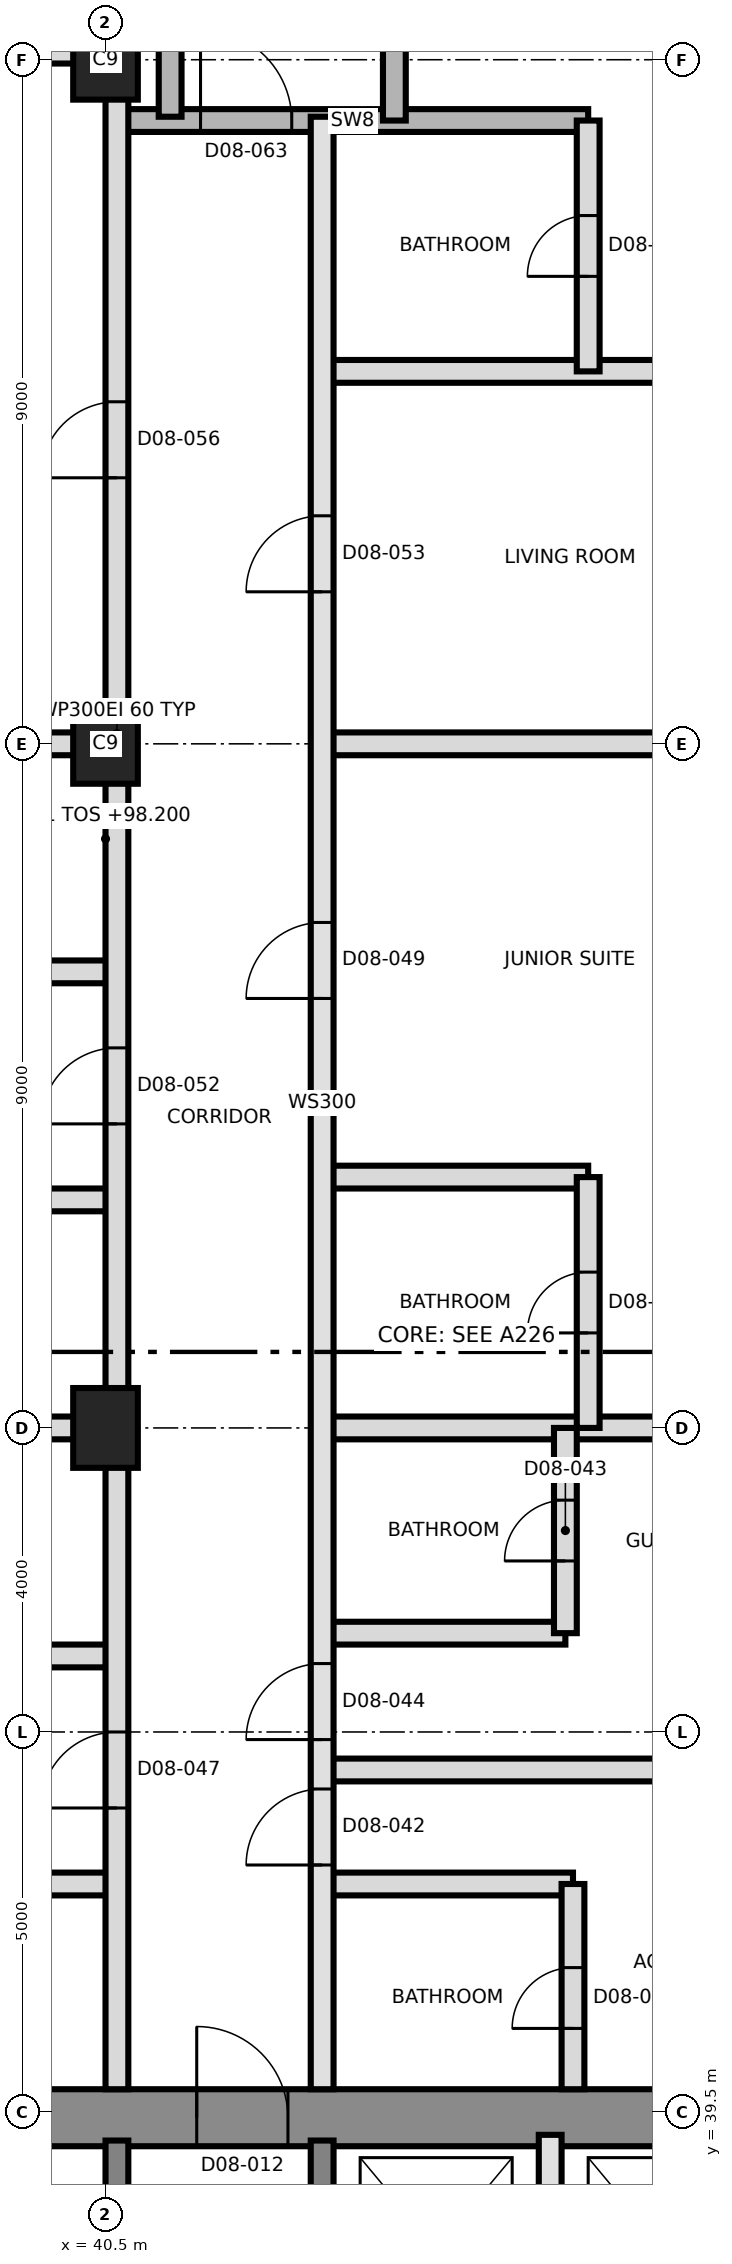
"""IFC4 building model, lengths in metres.
Left out: names, types, materials, properties, quantities, classifications, styles, units other than length and angle.
Written with IfcOpenShell. Run it as: python <this file> out.ifc"""

import sys

from ifc_helpers import new_model, si_unit, direction, frame, frame_2d, origin, origin_2d, place, context, subcontext, project, spatial, rectangle, extrude, element, fill, save


model = new_model("IFC4")
c1 = context("Model", 3, precision=1e-05, world=origin(), true_north=direction((0.0, 1.0)))
c2 = subcontext(c1, "Body", "Model", "MODEL_VIEW")
j1 = project(units=[si_unit("LENGTHUNIT", "METRE"), si_unit("PLANEANGLEUNIT", "RADIAN")], contexts=[c1])
p1 = place(None, origin())
s1 = spatial("IfcSite", under=j1, at=p1, CompositionType="ELEMENT")
p2 = place(p1, origin())
s2 = spatial("IfcBuilding", under=s1, at=p2, CompositionType="ELEMENT")
p3 = place(p2, frame((0.0, 0.0, 98.2)))
s3 = spatial("IfcBuildingStorey", under=s2, at=p3, CompositionType="ELEMENT", Elevation=98.2)
p4 = place(p3, frame((31.125, 39.425, 0.0), z_axis=(0.0, 0.0, 1.0), x_axis=(1.0, 0.0, 0.0)))
e1 = element("IfcWall", 1, at=p4, inside=s3, PredefinedType="SHEAR", context=c2, shape_type="SweptSolid", body=[
    extrude(rectangle(XDim=27.0, YDim=0.75, at=frame_2d((13.5, 0.0))), origin(), (0.0, 0.0, 1.0), 3.7),
])
p5 = place(p4, frame((10.575, 0.0, 0.0)))
e2 = element("IfcOpeningElement", 2, at=p5, cuts=e1, PredefinedType="OPENING", context=c2, shape_type="SweptSolid", body=[
    extrude(rectangle(XDim=1.2, YDim=2.1, at=frame_2d((0.6, 1.05))), frame((0.0, 0.385, 0.0), z_axis=(0.0, -1.0, 0.0), x_axis=(1.0, 0.0, 0.0)), (0.0, 0.0, 1.0), 0.77),
])
for number, where, z_axis, x_axis in (
    (3, (40.65, 33.5, 0.0), (0.0, 0.0, 1.0), (0.0, 1.0, 0.0)),
    (4, (43.35, 33.5, 0.0), (0.0, 0.0, 1.0), (0.0, 1.0, 0.0)),
):
    element("IfcWall", number, at=place(p3, frame(where, z_axis=z_axis, x_axis=x_axis)), inside=s3, PredefinedType="SHEAR", context=c2, shape_type="SweptSolid", body=[
        extrude(rectangle(XDim=5.625, YDim=0.3, at=frame_2d((2.812, 0.0))), origin(), (0.0, 0.0, 1.0), 3.7),
    ])
for number, where, z_axis, x_axis in (
    (5, (40.5, 48.5, 0.0), (0.0, 0.0, 1.0), (0.0, 1.0, 0.0)),
    (6, (40.5, 57.5, 0.0), (0.0, 0.0, 1.0), (0.0, 1.0, 0.0)),
    (7, (40.5, 66.5, 0.0), (0.0, 0.0, 1.0), (0.0, 1.0, 0.0)),
):
    element("IfcColumn", number, at=place(p3, frame(where, z_axis=z_axis, x_axis=x_axis)), inside=s3, PredefinedType="COLUMN", context=c2, shape_type="SweptSolid", body=[
        extrude(rectangle(XDim=1.05, YDim=0.85, at=origin_2d()), origin(), (0.0, 0.0, 1.0), 3.7),
    ])
p6 = place(p3, frame((46.35, 36.2, 0.0), z_axis=(0.0, 0.0, 1.0), x_axis=(0.0, 1.0, 0.0)))
e8 = element("IfcWall", 8, at=p6, inside=s3, PredefinedType="SOLIDWALL", context=c2, shape_type="SweptSolid", body=[
    extrude(rectangle(XDim=3.0, YDim=0.3, at=frame_2d((1.5, 0.0))), origin(), (0.0, 0.0, 1.0), 3.4),
])
for number, where, z_axis, x_axis in (
    (9, (37.35, 42.5, 0.0), (0.0, 0.0, 1.0), (1.0, 0.0, 0.0)),
    (10, (43.35, 42.5, 0.0), (0.0, 0.0, 1.0), (1.0, 0.0, 0.0)),
):
    element("IfcWall", number, at=place(p3, frame(where, z_axis=z_axis, x_axis=x_axis)), inside=s3, PredefinedType="PARTITIONING", context=c2, shape_type="SweptSolid", body=[
        extrude(rectangle(XDim=3.3, YDim=0.3, at=frame_2d((1.65, 0.0))), origin(), (0.0, 0.0, 1.0), 3.4),
    ])
p7 = place(p3, frame((43.35, 44.0, 0.0), z_axis=(0.0, 0.0, 1.0), x_axis=(1.0, 0.0, 0.0)))
e11 = element("IfcWall", 11, at=p7, inside=s3, PredefinedType="PARTITIONING", context=c2, shape_type="SweptSolid", body=[
    extrude(rectangle(XDim=6.596, YDim=0.3, at=frame_2d((3.298, 0.0))), origin(), (0.0, 0.0, 1.0), 3.4),
])
p8 = place(p3, frame((37.35, 45.5, 0.0), z_axis=(0.0, 0.0, 1.0), x_axis=(1.0, 0.0, 0.0)))
e12 = element("IfcWall", 12, at=p8, inside=s3, PredefinedType="PARTITIONING", context=c2, shape_type="SweptSolid", body=[
    extrude(rectangle(XDim=3.3, YDim=0.3, at=frame_2d((1.65, 0.0))), origin(), (0.0, 0.0, 1.0), 3.4),
])
p9 = place(p3, frame((43.35, 45.8, 0.0), z_axis=(0.0, 0.0, 1.0), x_axis=(1.0, 0.0, 0.0)))
e13 = element("IfcWall", 13, at=p9, inside=s3, PredefinedType="PARTITIONING", context=c2, shape_type="SweptSolid", body=[
    extrude(rectangle(XDim=3.2, YDim=0.3, at=frame_2d((1.6, 0.0))), origin(), (0.0, 0.0, 1.0), 3.4),
])
p10 = place(p3, frame((31.53, 48.5, 0.0), z_axis=(0.0, 0.0, 1.0), x_axis=(1.0, 0.0, 0.0)))
e14 = element("IfcWall", 14, at=p10, inside=s3, PredefinedType="PARTITIONING", context=c2, shape_type="SweptSolid", body=[
    extrude(rectangle(XDim=9.12, YDim=0.3, at=frame_2d((4.56, 0.0))), origin(), (0.0, 0.0, 1.0), 3.4),
])
p11 = place(p3, frame((43.35, 48.5, 0.0), z_axis=(0.0, 0.0, 1.0), x_axis=(1.0, 0.0, 0.0)))
e15 = element("IfcWall", 15, at=p11, inside=s3, PredefinedType="PARTITIONING", context=c2, shape_type="SweptSolid", body=[
    extrude(rectangle(XDim=6.12, YDim=0.3, at=frame_2d((3.06, 0.0))), origin(), (0.0, 0.0, 1.0), 3.4),
])
p12 = place(p3, frame((37.35, 51.5, 0.0), z_axis=(0.0, 0.0, 1.0), x_axis=(1.0, 0.0, 0.0)))
e16 = element("IfcWall", 16, at=p12, inside=s3, PredefinedType="PARTITIONING", context=c2, shape_type="SweptSolid", body=[
    extrude(rectangle(XDim=3.3, YDim=0.3, at=frame_2d((1.65, 0.0))), origin(), (0.0, 0.0, 1.0), 3.4),
])
p13 = place(p3, frame((43.35, 51.8, 0.0), z_axis=(0.0, 0.0, 1.0), x_axis=(1.0, 0.0, 0.0)))
e17 = element("IfcWall", 17, at=p13, inside=s3, PredefinedType="PARTITIONING", context=c2, shape_type="SweptSolid", body=[
    extrude(rectangle(XDim=3.5, YDim=0.3, at=frame_2d((1.75, 0.0))), origin(), (0.0, 0.0, 1.0), 3.4),
])
p14 = place(p3, frame((37.35, 54.5, 0.0), z_axis=(0.0, 0.0, 1.0), x_axis=(1.0, 0.0, 0.0)))
e18 = element("IfcWall", 18, at=p14, inside=s3, PredefinedType="PARTITIONING", context=c2, shape_type="SweptSolid", body=[
    extrude(rectangle(XDim=3.3, YDim=0.3, at=frame_2d((1.65, 0.0))), origin(), (0.0, 0.0, 1.0), 3.4),
])
p15 = place(p3, frame((31.53, 57.5, 0.0), z_axis=(0.0, 0.0, 1.0), x_axis=(1.0, 0.0, 0.0)))
e19 = element("IfcWall", 19, at=p15, inside=s3, PredefinedType="PARTITIONING", context=c2, shape_type="SweptSolid", body=[
    extrude(rectangle(XDim=9.12, YDim=0.3, at=frame_2d((4.56, 0.0))), origin(), (0.0, 0.0, 1.0), 3.4),
])
p16 = place(p3, frame((43.35, 57.5, 0.0), z_axis=(0.0, 0.0, 1.0), x_axis=(1.0, 0.0, 0.0)))
e20 = element("IfcWall", 20, at=p16, inside=s3, PredefinedType="PARTITIONING", context=c2, shape_type="SweptSolid", body=[
    extrude(rectangle(XDim=6.12, YDim=0.3, at=frame_2d((3.06, 0.0))), origin(), (0.0, 0.0, 1.0), 3.4),
])
p17 = place(p3, frame((43.35, 62.4, 0.0), z_axis=(0.0, 0.0, 1.0), x_axis=(1.0, 0.0, 0.0)))
e21 = element("IfcWall", 21, at=p17, inside=s3, PredefinedType="PARTITIONING", context=c2, shape_type="SweptSolid", body=[
    extrude(rectangle(XDim=6.3, YDim=0.3, at=frame_2d((3.15, 0.0))), origin(), (0.0, 0.0, 1.0), 3.4),
])
p18 = place(p17, frame((4.65, 0.0, 0.0)))
e22 = element("IfcOpeningElement", 22, at=p18, cuts=e21, PredefinedType="OPENING", context=c2, shape_type="SweptSolid", body=[
    extrude(rectangle(XDim=1.0, YDim=2.1, at=frame_2d((0.5, 1.05))), frame((0.0, 0.16, 0.0), z_axis=(0.0, -1.0, 0.0), x_axis=(1.0, 0.0, 0.0)), (0.0, 0.0, 1.0), 0.32),
])
p19 = place(p3, frame((40.65, 65.7, 0.0), z_axis=(0.0, 0.0, 1.0), x_axis=(1.0, 0.0, 0.0)))
e23 = element("IfcWall", 23, at=p19, inside=s3, PredefinedType="SHEAR", context=c2, shape_type="SweptSolid", body=[
    extrude(rectangle(XDim=6.2, YDim=0.3, at=frame_2d((3.1, 0.0))), origin(), (0.0, 0.0, 1.0), 3.4),
])
p20 = place(p19, frame((1.1, 0.0, 0.0)))
e24 = element("IfcOpeningElement", 24, at=p20, cuts=e23, PredefinedType="OPENING", context=c2, shape_type="SweptSolid", body=[
    extrude(rectangle(XDim=1.2, YDim=2.1, at=frame_2d((0.6, 1.05))), frame((0.0, 0.16, 0.0), z_axis=(0.0, -1.0, 0.0), x_axis=(1.0, 0.0, 0.0)), (0.0, 0.0, 1.0), 0.32),
])
p21 = place(p3, frame((31.53, 66.6, 0.0), z_axis=(0.0, 0.0, 1.0), x_axis=(1.0, 0.0, 0.0)))
e25 = element("IfcWall", 25, at=p21, inside=s3, PredefinedType="PARTITIONING", context=c2, shape_type="SweptSolid", body=[
    extrude(rectangle(XDim=9.12, YDim=0.3, at=frame_2d((4.56, 0.0))), origin(), (0.0, 0.0, 1.0), 3.4),
])
p22 = place(p21, frame((3.47, 0.0, 0.0)))
e26 = element("IfcOpeningElement", 26, at=p22, cuts=e25, PredefinedType="OPENING", context=c2, shape_type="SweptSolid", body=[
    extrude(rectangle(XDim=1.0, YDim=2.1, at=frame_2d((0.5, 1.05))), frame((0.0, 0.16, 0.0), z_axis=(0.0, -1.0, 0.0), x_axis=(1.0, 0.0, 0.0)), (0.0, 0.0, 1.0), 0.32),
])
p23 = place(p3, frame((40.65, 39.8, 0.0), z_axis=(0.0, 0.0, 1.0), x_axis=(0.0, 1.0, 0.0)))
e27 = element("IfcWall", 27, at=p23, inside=s3, PredefinedType="PARTITIONING", context=c2, shape_type="SweptSolid", body=[
    extrude(rectangle(XDim=35.67, YDim=0.3, at=frame_2d((17.835, 0.0))), origin(), (0.0, 0.0, 1.0), 3.4),
])
p24 = place(p23, frame((3.7, 0.0, 0.0)))
e28 = element("IfcOpeningElement", 28, at=p24, cuts=e27, PredefinedType="OPENING", context=c2, shape_type="SweptSolid", body=[
    extrude(rectangle(XDim=1.0, YDim=2.4, at=frame_2d((0.5, 1.2))), frame((0.0, 0.16, 0.0), z_axis=(0.0, -1.0, 0.0), x_axis=(1.0, 0.0, 0.0)), (0.0, 0.0, 1.0), 0.32),
])
p25 = place(p23, frame((12.7, 0.0, 0.0)))
e29 = element("IfcOpeningElement", 29, at=p25, cuts=e27, PredefinedType="OPENING", context=c2, shape_type="SweptSolid", body=[
    extrude(rectangle(XDim=1.0, YDim=2.4, at=frame_2d((0.5, 1.2))), frame((0.0, 0.16, 0.0), z_axis=(0.0, -1.0, 0.0), x_axis=(1.0, 0.0, 0.0)), (0.0, 0.0, 1.0), 0.32),
])
p26 = place(p23, frame((21.2, 0.0, 0.0)))
e30 = element("IfcOpeningElement", 30, at=p26, cuts=e27, PredefinedType="OPENING", context=c2, shape_type="SweptSolid", body=[
    extrude(rectangle(XDim=1.0, YDim=2.4, at=frame_2d((0.5, 1.2))), frame((0.0, 0.16, 0.0), z_axis=(0.0, -1.0, 0.0), x_axis=(1.0, 0.0, 0.0)), (0.0, 0.0, 1.0), 0.32),
])
p27 = place(p3, frame((41.35, 65.75, 0.0), z_axis=(0.0, 0.0, 1.0), x_axis=(0.0, 1.0, 0.0)))
e31 = element("IfcWall", 31, at=p27, inside=s3, PredefinedType="SHEAR", context=c2, shape_type="SweptSolid", body=[
    extrude(rectangle(XDim=8.85, YDim=0.3, at=frame_2d((4.425, 0.0))), origin(), (0.0, 0.0, 1.0), 3.4),
])
p28 = place(p3, frame((43.35, 39.8, 0.0), z_axis=(0.0, 0.0, 1.0), x_axis=(0.0, 1.0, 0.0)))
e32 = element("IfcWall", 32, at=p28, inside=s3, PredefinedType="SOLIDWALL", context=c2, shape_type="SweptSolid", body=[
    extrude(rectangle(XDim=25.95, YDim=0.3, at=frame_2d((12.975, 0.0))), origin(), (0.0, 0.0, 1.0), 3.4),
])
p29 = place(p28, frame((2.95, 0.0, 0.0)))
e33 = element("IfcOpeningElement", 33, at=p29, cuts=e32, PredefinedType="OPENING", context=c2, shape_type="SweptSolid", body=[
    extrude(rectangle(XDim=1.0, YDim=2.1, at=frame_2d((0.5, 1.05))), frame((0.0, 0.16, 0.0), z_axis=(0.0, -1.0, 0.0), x_axis=(1.0, 0.0, 0.0)), (0.0, 0.0, 1.0), 0.32),
])
p30 = place(p28, frame((4.6, 0.0, 0.0)))
e34 = element("IfcOpeningElement", 34, at=p30, cuts=e32, PredefinedType="OPENING", context=c2, shape_type="SweptSolid", body=[
    extrude(rectangle(XDim=1.0, YDim=2.1, at=frame_2d((0.5, 1.05))), frame((0.0, 0.16, 0.0), z_axis=(0.0, -1.0, 0.0), x_axis=(1.0, 0.0, 0.0)), (0.0, 0.0, 1.0), 0.32),
])
p31 = place(p28, frame((14.35, 0.0, 0.0)))
e35 = element("IfcOpeningElement", 35, at=p31, cuts=e32, PredefinedType="OPENING", context=c2, shape_type="SweptSolid", body=[
    extrude(rectangle(XDim=1.0, YDim=2.4, at=frame_2d((0.5, 1.2))), frame((0.0, 0.16, 0.0), z_axis=(0.0, -1.0, 0.0), x_axis=(1.0, 0.0, 0.0)), (0.0, 0.0, 1.0), 0.32),
])
p32 = place(p28, frame((19.7, 0.0, 0.0)))
e36 = element("IfcOpeningElement", 36, at=p32, cuts=e32, PredefinedType="OPENING", context=c2, shape_type="SweptSolid", body=[
    extrude(rectangle(XDim=1.0, YDim=2.4, at=frame_2d((0.5, 1.2))), frame((0.0, 0.16, 0.0), z_axis=(0.0, -1.0, 0.0), x_axis=(1.0, 0.0, 0.0)), (0.0, 0.0, 1.0), 0.32),
])
p33 = place(p3, frame((44.3, 65.7, 0.0), z_axis=(0.0, 0.0, 1.0), x_axis=(0.0, 1.0, 0.0)))
e37 = element("IfcWall", 37, at=p33, inside=s3, PredefinedType="SHEAR", context=c2, shape_type="SweptSolid", body=[
    extrude(rectangle(XDim=8.9, YDim=0.3, at=frame_2d((4.45, 0.0))), origin(), (0.0, 0.0, 1.0), 3.4),
])
p34 = place(p3, frame((46.55, 45.8, 0.0), z_axis=(0.0, 0.0, 1.0), x_axis=(0.0, 1.0, 0.0)))
e38 = element("IfcWall", 38, at=p34, inside=s3, PredefinedType="PARTITIONING", context=c2, shape_type="SweptSolid", body=[
    extrude(rectangle(XDim=2.7, YDim=0.3, at=frame_2d((1.35, 0.0))), origin(), (0.0, 0.0, 1.0), 3.4),
])
p35 = place(p34, frame((0.95, 0.0, 0.0)))
e39 = element("IfcOpeningElement", 39, at=p35, cuts=e38, PredefinedType="OPENING", context=c2, shape_type="SweptSolid", body=[
    extrude(rectangle(XDim=0.8, YDim=2.1, at=frame_2d((0.4, 1.05))), frame((0.0, 0.16, 0.0), z_axis=(0.0, -1.0, 0.0), x_axis=(1.0, 0.0, 0.0)), (0.0, 0.0, 1.0), 0.32),
])
p36 = place(p3, frame((46.65, 39.8, 0.0), z_axis=(0.0, 0.0, 1.0), x_axis=(0.0, 1.0, 0.0)))
e40 = element("IfcWall", 40, at=p36, inside=s3, PredefinedType="PARTITIONING", context=c2, shape_type="SweptSolid", body=[
    extrude(rectangle(XDim=2.7, YDim=0.3, at=frame_2d((1.35, 0.0))), origin(), (0.0, 0.0, 1.0), 3.4),
])
p37 = place(p36, frame((0.8, 0.0, 0.0)))
e41 = element("IfcOpeningElement", 41, at=p37, cuts=e40, PredefinedType="OPENING", context=c2, shape_type="SweptSolid", body=[
    extrude(rectangle(XDim=0.8, YDim=2.1, at=frame_2d((0.4, 1.05))), frame((0.0, 0.16, 0.0), z_axis=(0.0, -1.0, 0.0), x_axis=(1.0, 0.0, 0.0)), (0.0, 0.0, 1.0), 0.32),
])
p38 = place(p3, frame((46.85, 48.5, 0.0), z_axis=(0.0, 0.0, 1.0), x_axis=(0.0, 1.0, 0.0)))
e42 = element("IfcWall", 42, at=p38, inside=s3, PredefinedType="PARTITIONING", context=c2, shape_type="SweptSolid", body=[
    extrude(rectangle(XDim=3.3, YDim=0.3, at=frame_2d((1.65, 0.0))), origin(), (0.0, 0.0, 1.0), 3.4),
])
p39 = place(p38, frame((1.25, 0.0, 0.0)))
e43 = element("IfcOpeningElement", 43, at=p39, cuts=e42, PredefinedType="OPENING", context=c2, shape_type="SweptSolid", body=[
    extrude(rectangle(XDim=0.8, YDim=2.1, at=frame_2d((0.4, 1.05))), frame((0.0, 0.16, 0.0), z_axis=(0.0, -1.0, 0.0), x_axis=(1.0, 0.0, 0.0)), (0.0, 0.0, 1.0), 0.32),
])
p40 = place(p3, frame((46.85, 62.4, 0.0), z_axis=(0.0, 0.0, 1.0), x_axis=(0.0, 1.0, 0.0)))
e44 = element("IfcWall", 44, at=p40, inside=s3, PredefinedType="PARTITIONING", context=c2, shape_type="SweptSolid", body=[
    extrude(rectangle(XDim=3.3, YDim=0.3, at=frame_2d((1.65, 0.0))), origin(), (0.0, 0.0, 1.0), 3.4),
])
p41 = place(p40, frame((1.25, 0.0, 0.0)))
e45 = element("IfcOpeningElement", 45, at=p41, cuts=e44, PredefinedType="OPENING", context=c2, shape_type="SweptSolid", body=[
    extrude(rectangle(XDim=0.8, YDim=2.1, at=frame_2d((0.4, 1.05))), frame((0.0, 0.16, 0.0), z_axis=(0.0, -1.0, 0.0), x_axis=(1.0, 0.0, 0.0)), (0.0, 0.0, 1.0), 0.32),
])
p42 = place(p5, origin())
e46 = element("IfcDoor", 46, at=p42, inside=s3, OperationType="SINGLE_SWING_RIGHT", PredefinedType="DOOR", context=c2, shape_type="SweptSolid", body=[
    extrude(rectangle(XDim=1.2, YDim=2.1, at=frame_2d((0.6, 1.05))), frame((0.0, 0.025, 0.0), z_axis=(0.0, -1.0, 0.0), x_axis=(1.0, 0.0, 0.0)), (0.0, 0.0, 1.0), 0.05),
])
fill(e2, e46)
p43 = place(p37, origin())
e47 = element("IfcDoor", 47, at=p43, inside=s3, OperationType="SINGLE_SWING_RIGHT", PredefinedType="DOOR", context=c2, shape_type="SweptSolid", body=[
    extrude(rectangle(XDim=0.8, YDim=2.1, at=frame_2d((0.4, 1.05))), frame((0.0, 0.025, 0.0), z_axis=(0.0, -1.0, 0.0), x_axis=(1.0, 0.0, 0.0)), (0.0, 0.0, 1.0), 0.05),
])
fill(e41, e47)
p44 = place(p29, origin())
e48 = element("IfcDoor", 48, at=p44, inside=s3, OperationType="SINGLE_SWING_LEFT", PredefinedType="DOOR", context=c2, shape_type="SweptSolid", body=[
    extrude(rectangle(XDim=1.0, YDim=2.1, at=frame_2d((0.5, 1.05))), frame((0.0, 0.025, 0.0), z_axis=(0.0, -1.0, 0.0), x_axis=(1.0, 0.0, 0.0)), (0.0, 0.0, 1.0), 0.05),
])
fill(e33, e48)
p45 = place(p35, origin())
e49 = element("IfcDoor", 49, at=p45, inside=s3, OperationType="SINGLE_SWING_LEFT", PredefinedType="DOOR", context=c2, shape_type="SweptSolid", body=[
    extrude(rectangle(XDim=0.8, YDim=2.1, at=frame_2d((0.4, 1.05))), frame((0.0, 0.025, 0.0), z_axis=(0.0, -1.0, 0.0), x_axis=(1.0, 0.0, 0.0)), (0.0, 0.0, 1.0), 0.05),
])
fill(e39, e49)
p46 = place(p30, origin())
e50 = element("IfcDoor", 50, at=p46, inside=s3, OperationType="SINGLE_SWING_LEFT", PredefinedType="DOOR", context=c2, shape_type="SweptSolid", body=[
    extrude(rectangle(XDim=1.0, YDim=2.1, at=frame_2d((0.5, 1.05))), frame((0.0, 0.025, 0.0), z_axis=(0.0, -1.0, 0.0), x_axis=(1.0, 0.0, 0.0)), (0.0, 0.0, 1.0), 0.05),
])
fill(e34, e50)
p47 = place(p24, origin())
e51 = element("IfcDoor", 51, at=p47, inside=s3, OperationType="SINGLE_SWING_RIGHT", PredefinedType="DOOR", context=c2, shape_type="SweptSolid", body=[
    extrude(rectangle(XDim=1.0, YDim=2.4, at=frame_2d((0.5, 1.2))), frame((0.0, 0.025, 0.0), z_axis=(0.0, -1.0, 0.0), x_axis=(1.0, 0.0, 0.0)), (0.0, 0.0, 1.0), 0.05),
])
fill(e28, e51)
p48 = place(p39, origin())
e52 = element("IfcDoor", 52, at=p48, inside=s3, OperationType="SINGLE_SWING_LEFT", PredefinedType="DOOR", context=c2, shape_type="SweptSolid", body=[
    extrude(rectangle(XDim=0.8, YDim=2.1, at=frame_2d((0.4, 1.05))), frame((0.0, 0.025, 0.0), z_axis=(0.0, -1.0, 0.0), x_axis=(1.0, 0.0, 0.0)), (0.0, 0.0, 1.0), 0.05),
])
fill(e43, e52)
p49 = place(p31, origin())
e53 = element("IfcDoor", 53, at=p49, inside=s3, OperationType="SINGLE_SWING_RIGHT", PredefinedType="DOOR", context=c2, shape_type="SweptSolid", body=[
    extrude(rectangle(XDim=1.0, YDim=2.4, at=frame_2d((0.5, 1.2))), frame((0.0, 0.025, 0.0), z_axis=(0.0, -1.0, 0.0), x_axis=(1.0, 0.0, 0.0)), (0.0, 0.0, 1.0), 0.05),
])
fill(e35, e53)
p50 = place(p25, origin())
e54 = element("IfcDoor", 54, at=p50, inside=s3, OperationType="SINGLE_SWING_LEFT", PredefinedType="DOOR", context=c2, shape_type="SweptSolid", body=[
    extrude(rectangle(XDim=1.0, YDim=2.4, at=frame_2d((0.5, 1.2))), frame((0.0, 0.025, 0.0), z_axis=(0.0, -1.0, 0.0), x_axis=(1.0, 0.0, 0.0)), (0.0, 0.0, 1.0), 0.05),
])
fill(e29, e54)
p51 = place(p32, origin())
e55 = element("IfcDoor", 55, at=p51, inside=s3, OperationType="SINGLE_SWING_LEFT", PredefinedType="DOOR", context=c2, shape_type="SweptSolid", body=[
    extrude(rectangle(XDim=1.0, YDim=2.4, at=frame_2d((0.5, 1.2))), frame((0.0, 0.025, 0.0), z_axis=(0.0, -1.0, 0.0), x_axis=(1.0, 0.0, 0.0)), (0.0, 0.0, 1.0), 0.05),
])
fill(e36, e55)
p52 = place(p41, origin())
e56 = element("IfcDoor", 56, at=p52, inside=s3, OperationType="SINGLE_SWING_LEFT", PredefinedType="DOOR", context=c2, shape_type="SweptSolid", body=[
    extrude(rectangle(XDim=0.8, YDim=2.1, at=frame_2d((0.4, 1.05))), frame((0.0, 0.025, 0.0), z_axis=(0.0, -1.0, 0.0), x_axis=(1.0, 0.0, 0.0)), (0.0, 0.0, 1.0), 0.05),
])
fill(e45, e56)
p53 = place(p26, origin())
e57 = element("IfcDoor", 57, at=p53, inside=s3, OperationType="SINGLE_SWING_LEFT", PredefinedType="DOOR", context=c2, shape_type="SweptSolid", body=[
    extrude(rectangle(XDim=1.0, YDim=2.4, at=frame_2d((0.5, 1.2))), frame((0.0, 0.025, 0.0), z_axis=(0.0, -1.0, 0.0), x_axis=(1.0, 0.0, 0.0)), (0.0, 0.0, 1.0), 0.05),
])
fill(e30, e57)
p54 = place(p20, origin())
e58 = element("IfcDoor", 58, at=p54, inside=s3, OperationType="SINGLE_SWING_RIGHT", PredefinedType="DOOR", context=c2, shape_type="SweptSolid", body=[
    extrude(rectangle(XDim=1.2, YDim=2.1, at=frame_2d((0.6, 1.05))), frame((0.0, 0.025, 0.0), z_axis=(0.0, -1.0, 0.0), x_axis=(1.0, 0.0, 0.0)), (0.0, 0.0, 1.0), 0.05),
])
fill(e24, e58)
save(model, sys.argv[1])
